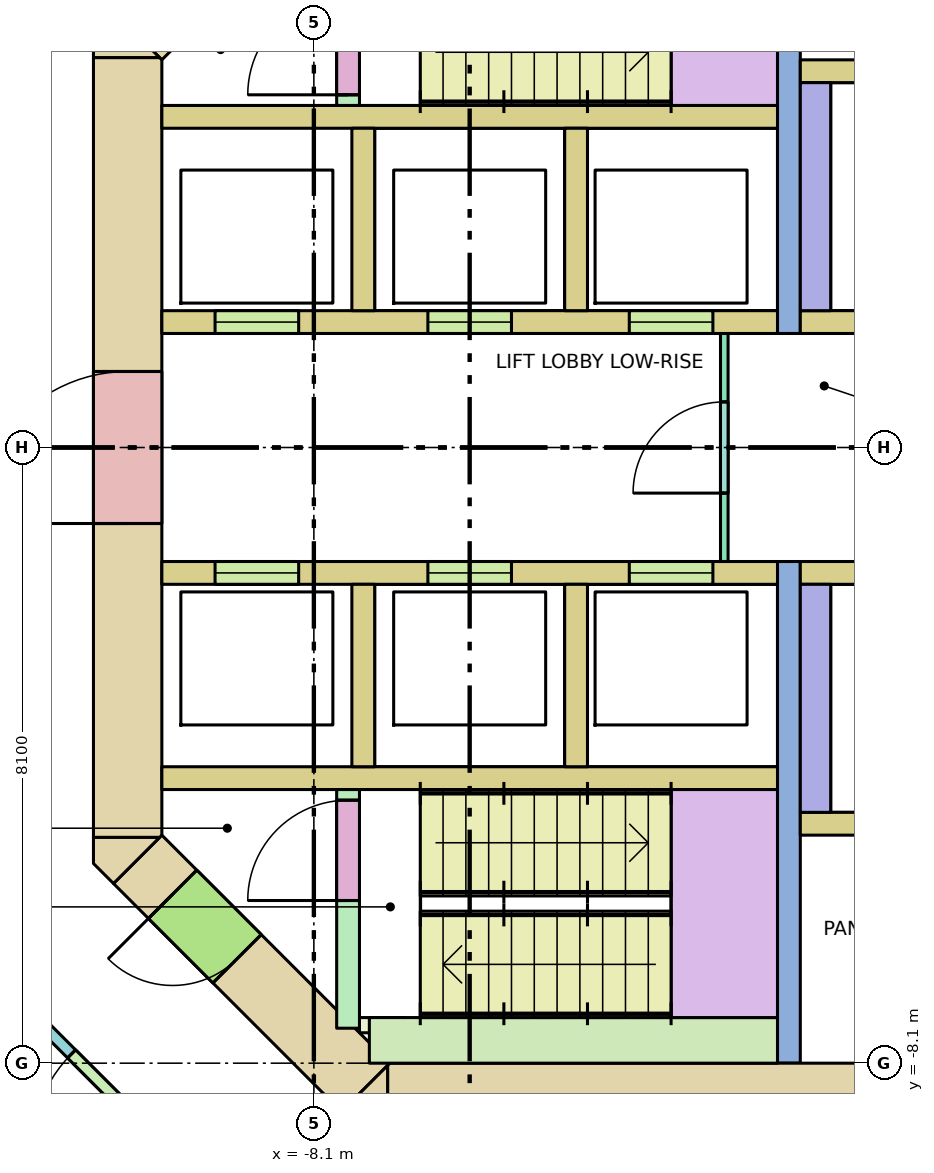
"""IFC4 building model, lengths in metres.
Left out: names, types, materials, properties, quantities, classifications, styles, units other than length and angle.
Written with IfcOpenShell. Run it as: python <this file> out.ifc"""

import sys

from ifc_helpers import new_model, si_unit, direction, frame, frame_2d, origin, place, context, subcontext, project, spatial, polyline, rectangle, outline, extrude, element, fill, save


model = new_model("IFC4")
c1 = context("Model", 3, precision=1e-05, world=origin(), true_north=direction((0.0, 1.0)))
c2 = subcontext(c1, "Body", "Model", "MODEL_VIEW")
j1 = project(units=[si_unit("LENGTHUNIT", "METRE"), si_unit("PLANEANGLEUNIT", "RADIAN")], contexts=[c1])
p1 = place(None, origin())
s1 = spatial("IfcSite", under=j1, at=p1, CompositionType="ELEMENT")
p2 = place(p1, origin())
s2 = spatial("IfcBuilding", under=s1, at=p2, CompositionType="ELEMENT")
p3 = place(p2, frame((0.0, 0.0, 27.0)))
s3 = spatial("IfcBuildingStorey", under=s2, at=p3, CompositionType="ELEMENT", Elevation=27.0)
p4 = place(p3, frame((-7.13, -8.55, -0.28), z_axis=(0.0, 0.0, 1.0), x_axis=(1.0, 0.0, 0.0)))
e1 = element("IfcWall", 1, at=p4, inside=s3, PredefinedType="SHEAR", context=c2, shape_type="SweptSolid", body=[
    extrude(rectangle(XDim=14.26, YDim=0.9, at=frame_2d((7.13, 0.0))), origin(), (0.0, 0.0, 1.0), 4.0),
])
p5 = place(p4, frame((8.08, 0.0, 0.28)))
e2 = element("IfcOpeningElement", 2, at=p5, cuts=e1, PredefinedType="OPENING", context=c2, shape_type="SweptSolid", body=[
    extrude(rectangle(XDim=0.7, YDim=2.1, at=frame_2d((0.35, 1.05))), frame((0.0, 0.46, 0.0), z_axis=(0.0, -1.0, 0.0), x_axis=(1.0, 0.0, 0.0)), (0.0, 0.0, 1.0), 0.92),
])
p6 = place(p4, frame((6.205, 0.0, 0.28)))
e3 = element("IfcOpeningElement", 3, at=p6, cuts=e1, PredefinedType="OPENING", context=c2, shape_type="SweptSolid", body=[
    extrude(rectangle(XDim=0.9, YDim=2.1, at=frame_2d((0.45, 1.05))), frame((0.0, 0.46, 0.0), z_axis=(0.0, -1.0, 0.0), x_axis=(1.0, 0.0, 0.0)), (0.0, 0.0, 1.0), 0.92),
])
p7 = place(p4, frame((10.667, 0.0, 0.28)))
e4 = element("IfcOpeningElement", 4, at=p7, cuts=e1, PredefinedType="OPENING", context=c2, shape_type="SweptSolid", body=[
    extrude(rectangle(XDim=0.9, YDim=2.1, at=frame_2d((0.45, 1.05))), frame((0.0, 0.46, 0.0), z_axis=(0.0, -1.0, 0.0), x_axis=(1.0, 0.0, 0.0)), (0.0, 0.0, 1.0), 0.92),
])
p8 = place(p3, frame((-10.55, -5.13, -0.28), z_axis=(0.0, 0.0, 1.0), x_axis=(0.0, 1.0, 0.0)))
e5 = element("IfcWall", 5, at=p8, inside=s3, PredefinedType="SHEAR", context=c2, shape_type="SweptSolid", body=[
    extrude(rectangle(XDim=10.26, YDim=0.9, at=frame_2d((5.13, 0.0))), origin(), (0.0, 0.0, 1.0), 4.0),
])
p9 = place(p8, frame((4.13, 0.0, 0.28)))
e6 = element("IfcOpeningElement", 6, at=p9, cuts=e5, PredefinedType="OPENING", context=c2, shape_type="SweptSolid", body=[
    extrude(rectangle(XDim=2.0, YDim=2.1, at=frame_2d((1.0, 1.05))), frame((0.0, 0.46, 0.0), z_axis=(0.0, -1.0, 0.0), x_axis=(1.0, 0.0, 0.0)), (0.0, 0.0, 1.0), 0.92),
])
p10 = place(p3, frame((-10.418, 5.418, -0.28), z_axis=(0.0, 0.0, 1.0), x_axis=(0.707106781187, 0.707106781187, 0.0)))
e7 = element("IfcWall", 7, at=p10, inside=s3, PredefinedType="SHEAR", context=c2, shape_type="SweptSolid", body=[
    extrude(rectangle(XDim=4.243, YDim=0.9, at=frame_2d((2.121, 0.0))), origin(), (0.0, 0.0, 1.0), 4.0),
])
p11 = place(p10, frame((0.65, 0.0, 0.28)))
e8 = element("IfcOpeningElement", 8, at=p11, cuts=e7, PredefinedType="OPENING", context=c2, shape_type="SweptSolid", body=[
    extrude(rectangle(XDim=1.2, YDim=2.1, at=frame_2d((0.6, 1.05))), frame((0.0, 0.46, 0.0), z_axis=(0.0, -1.0, 0.0), x_axis=(1.0, 0.0, 0.0)), (0.0, 0.0, 1.0), 0.92),
])
p12 = place(p3, frame((-7.418, -8.418, -0.28), z_axis=(0.0, 0.0, 1.0), x_axis=(-0.707106781187, 0.707106781187, 0.0)))
e9 = element("IfcWall", 9, at=p12, inside=s3, PredefinedType="SHEAR", context=c2, shape_type="SweptSolid", body=[
    extrude(rectangle(XDim=4.243, YDim=0.9, at=frame_2d((2.121, 0.0))), origin(), (0.0, 0.0, 1.0), 4.0),
])
p13 = place(p12, frame((2.393, 0.0, 0.28)))
e10 = element("IfcOpeningElement", 10, at=p13, cuts=e9, PredefinedType="OPENING", context=c2, shape_type="SweptSolid", body=[
    extrude(rectangle(XDim=1.2, YDim=2.1, at=frame_2d((0.6, 1.05))), frame((0.0, 0.46, 0.0), z_axis=(0.0, -1.0, 0.0), x_axis=(1.0, 0.0, 0.0)), (0.0, 0.0, 1.0), 0.92),
])
p14 = place(p3, frame((0.0, 0.0, -0.28)))
e11 = element("IfcWall", 11, at=p14, inside=s3, PredefinedType="SHEAR", context=c2, shape_type="SweptSolid", body=[
    extrude(outline(polyline([(-7.473, -9.0), (-7.736, -8.736), (-7.13, -8.13), (-7.13, -9.0), (-7.473, -9.0)])), origin(), (0.0, 0.0, 1.0), 4.0),
])
p15 = place(p3, frame((0.0, 0.0, -0.28)))
e12 = element("IfcWall", 12, at=p15, inside=s3, PredefinedType="SHEAR", context=c2, shape_type="SweptSolid", body=[
    extrude(outline(polyline([(-11.0, -5.473), (-11.0, -5.13), (-10.13, -5.13), (-10.736, -5.736), (-11.0, -5.473)])), origin(), (0.0, 0.0, 1.0), 4.0),
])
p16 = place(p3, frame((0.0, 0.0, -0.28)))
e13 = element("IfcWall", 13, at=p16, inside=s3, PredefinedType="SHEAR", context=c2, shape_type="SweptSolid", body=[
    extrude(outline(polyline([(-10.736, 5.736), (-10.13, 5.13), (-11.0, 5.13), (-11.0, 5.473), (-10.736, 5.736)])), origin(), (0.0, 0.0, 1.0), 4.0),
])
for number, where, z_axis, x_axis in (
    (14, (-10.1, 4.35, 0.0), (0.0, 0.0, 1.0), (1.0, 0.0, 0.0)),
    (15, (-10.1, -4.35, 0.0), (0.0, 0.0, 1.0), (1.0, 0.0, 0.0)),
):
    element("IfcWall", number, at=place(p3, frame(where, z_axis=z_axis, x_axis=x_axis)), inside=s3, PredefinedType="SOLIDWALL", context=c2, shape_type="SweptSolid", body=[
        extrude(rectangle(XDim=8.1, YDim=0.3, at=frame_2d((4.05, 0.0))), origin(), (0.0, 0.0, 1.0), 3.72),
    ])
p17 = place(p3, frame((-10.1, 1.65, 0.0), z_axis=(0.0, 0.0, 1.0), x_axis=(1.0, 0.0, 0.0)))
e16 = element("IfcWall", 16, at=p17, inside=s3, PredefinedType="SOLIDWALL", context=c2, shape_type="SweptSolid", body=[
    extrude(rectangle(XDim=8.1, YDim=0.3, at=frame_2d((4.05, 0.0))), origin(), (0.0, 0.0, 1.0), 3.72),
])
p18 = place(p17, frame((0.7, 0.0, 0.0)))
e17 = element("IfcOpeningElement", 17, at=p18, cuts=e16, PredefinedType="OPENING", context=c2, shape_type="SweptSolid", body=[
    extrude(rectangle(XDim=1.1, YDim=2.1, at=frame_2d((0.55, 1.05))), frame((0.0, 0.16, 0.0), z_axis=(0.0, -1.0, 0.0), x_axis=(1.0, 0.0, 0.0)), (0.0, 0.0, 1.0), 0.32),
])
p19 = place(p17, frame((3.5, 0.0, 0.0)))
e18 = element("IfcOpeningElement", 18, at=p19, cuts=e16, PredefinedType="OPENING", context=c2, shape_type="SweptSolid", body=[
    extrude(rectangle(XDim=1.1, YDim=2.1, at=frame_2d((0.55, 1.05))), frame((0.0, 0.16, 0.0), z_axis=(0.0, -1.0, 0.0), x_axis=(1.0, 0.0, 0.0)), (0.0, 0.0, 1.0), 0.32),
])
p20 = place(p17, frame((6.15, 0.0, 0.0)))
e19 = element("IfcOpeningElement", 19, at=p20, cuts=e16, PredefinedType="OPENING", context=c2, shape_type="SweptSolid", body=[
    extrude(rectangle(XDim=1.1, YDim=2.1, at=frame_2d((0.55, 1.05))), frame((0.0, 0.16, 0.0), z_axis=(0.0, -1.0, 0.0), x_axis=(1.0, 0.0, 0.0)), (0.0, 0.0, 1.0), 0.32),
])
p21 = place(p3, frame((-10.1, -1.65, 0.0), z_axis=(0.0, 0.0, 1.0), x_axis=(1.0, 0.0, 0.0)))
e20 = element("IfcWall", 20, at=p21, inside=s3, PredefinedType="SOLIDWALL", context=c2, shape_type="SweptSolid", body=[
    extrude(rectangle(XDim=8.1, YDim=0.3, at=frame_2d((4.05, 0.0))), origin(), (0.0, 0.0, 1.0), 3.72),
])
p22 = place(p21, frame((0.7, 0.0, 0.0)))
e21 = element("IfcOpeningElement", 21, at=p22, cuts=e20, PredefinedType="OPENING", context=c2, shape_type="SweptSolid", body=[
    extrude(rectangle(XDim=1.1, YDim=2.1, at=frame_2d((0.55, 1.05))), frame((0.0, 0.16, 0.0), z_axis=(0.0, -1.0, 0.0), x_axis=(1.0, 0.0, 0.0)), (0.0, 0.0, 1.0), 0.32),
])
p23 = place(p21, frame((3.5, 0.0, 0.0)))
e22 = element("IfcOpeningElement", 22, at=p23, cuts=e20, PredefinedType="OPENING", context=c2, shape_type="SweptSolid", body=[
    extrude(rectangle(XDim=1.1, YDim=2.1, at=frame_2d((0.55, 1.05))), frame((0.0, 0.16, 0.0), z_axis=(0.0, -1.0, 0.0), x_axis=(1.0, 0.0, 0.0)), (0.0, 0.0, 1.0), 0.32),
])
p24 = place(p21, frame((6.15, 0.0, 0.0)))
e23 = element("IfcOpeningElement", 23, at=p24, cuts=e20, PredefinedType="OPENING", context=c2, shape_type="SweptSolid", body=[
    extrude(rectangle(XDim=1.1, YDim=2.1, at=frame_2d((0.55, 1.05))), frame((0.0, 0.16, 0.0), z_axis=(0.0, -1.0, 0.0), x_axis=(1.0, 0.0, 0.0)), (0.0, 0.0, 1.0), 0.32),
])
for number, where, z_axis, x_axis in (
    (24, (-7.45, 1.8, 0.0), (0.0, 0.0, 1.0), (0.0, 1.0, 0.0)),
    (25, (-7.45, -4.2, 0.0), (0.0, 0.0, 1.0), (0.0, 1.0, 0.0)),
    (26, (-4.65, 1.8, 0.0), (0.0, 0.0, 1.0), (0.0, 1.0, 0.0)),
    (27, (-4.65, -4.2, 0.0), (0.0, 0.0, 1.0), (0.0, 1.0, 0.0)),
):
    element("IfcWall", number, at=place(p3, frame(where, z_axis=z_axis, x_axis=x_axis)), inside=s3, PredefinedType="SOLIDWALL", context=c2, shape_type="SweptSolid", body=[
        extrude(rectangle(XDim=2.4, YDim=0.3, at=frame_2d((1.2, 0.0))), origin(), (0.0, 0.0, 1.0), 3.72),
    ])
for number, where, z_axis, x_axis in (
    (28, (-1.85, 1.5, 0.0), (0.0, 0.0, 1.0), (0.0, 1.0, 0.0)),
    (29, (-1.85, -8.1, 0.0), (0.0, 0.0, 1.0), (0.0, 1.0, 0.0)),
):
    element("IfcWall", number, at=place(p3, frame(where, z_axis=z_axis, x_axis=x_axis)), inside=s3, PredefinedType="SHEAR", context=c2, shape_type="SweptSolid", body=[
        extrude(rectangle(XDim=6.6, YDim=0.3, at=frame_2d((3.3, 0.0))), origin(), (0.0, 0.0, 1.0), 3.72),
    ])
p25 = place(p3, frame((-1.7, 1.65, 0.0), z_axis=(0.0, 0.0, 1.0), x_axis=(1.0, 0.0, 0.0)))
e30 = element("IfcWall", 30, at=p25, inside=s3, PredefinedType="SOLIDWALL", context=c2, shape_type="SweptSolid", body=[
    extrude(rectangle(XDim=3.4, YDim=0.3, at=frame_2d((1.7, 0.0))), origin(), (0.0, 0.0, 1.0), 3.72),
])
p26 = place(p25, frame((1.15, 0.0, 0.0)))
e31 = element("IfcOpeningElement", 31, at=p26, cuts=e30, PredefinedType="OPENING", context=c2, shape_type="SweptSolid", body=[
    extrude(rectangle(XDim=1.1, YDim=2.1, at=frame_2d((0.55, 1.05))), frame((0.0, 0.16, 0.0), z_axis=(0.0, -1.0, 0.0), x_axis=(1.0, 0.0, 0.0)), (0.0, 0.0, 1.0), 0.32),
])
p27 = place(p3, frame((-1.7, -1.65, 0.0), z_axis=(0.0, 0.0, 1.0), x_axis=(1.0, 0.0, 0.0)))
e32 = element("IfcWall", 32, at=p27, inside=s3, PredefinedType="SOLIDWALL", context=c2, shape_type="SweptSolid", body=[
    extrude(rectangle(XDim=3.4, YDim=0.3, at=frame_2d((1.7, 0.0))), origin(), (0.0, 0.0, 1.0), 3.72),
])
p28 = place(p27, frame((1.15, 0.0, 0.0)))
e33 = element("IfcOpeningElement", 33, at=p28, cuts=e32, PredefinedType="OPENING", context=c2, shape_type="SweptSolid", body=[
    extrude(rectangle(XDim=1.1, YDim=2.1, at=frame_2d((0.55, 1.05))), frame((0.0, 0.16, 0.0), z_axis=(0.0, -1.0, 0.0), x_axis=(1.0, 0.0, 0.0)), (0.0, 0.0, 1.0), 0.32),
])
for number, where, z_axis, x_axis in (
    (34, (-1.5, 1.8, 0.0), (0.0, 0.0, 1.0), (0.0, 1.0, 0.0)),
    (35, (-1.5, -4.8, 0.0), (0.0, 0.0, 1.0), (0.0, 1.0, 0.0)),
):
    element("IfcWall", number, at=place(p3, frame(where, z_axis=z_axis, x_axis=x_axis)), inside=s3, PredefinedType="SOLIDWALL", context=c2, shape_type="SweptSolid", body=[
        extrude(rectangle(XDim=3.0, YDim=0.4, at=frame_2d((1.5, 0.0))), origin(), (0.0, 0.0, 1.0), 3.72),
    ])
for number, where, z_axis, x_axis in (
    (36, (-1.7, 4.95, 0.0), (0.0, 0.0, 1.0), (1.0, 0.0, 0.0)),
    (37, (-1.7, -4.95, 0.0), (0.0, 0.0, 1.0), (1.0, 0.0, 0.0)),
):
    element("IfcWall", number, at=place(p3, frame(where, z_axis=z_axis, x_axis=x_axis)), inside=s3, PredefinedType="SOLIDWALL", context=c2, shape_type="SweptSolid", body=[
        extrude(rectangle(XDim=3.4, YDim=0.3, at=frame_2d((1.7, 0.0))), origin(), (0.0, 0.0, 1.0), 3.72),
    ])
p29 = place(p3, frame((-7.65, 4.5, 0.0), z_axis=(0.0, 0.0, 1.0), x_axis=(0.0, 1.0, 0.0)))
e38 = element("IfcWall", 38, at=p29, inside=s3, PredefinedType="SHEAR", context=c2, shape_type="SweptSolid", body=[
    extrude(rectangle(XDim=3.14, YDim=0.3, at=frame_2d((1.57, 0.0))), origin(), (0.0, 0.0, 1.0), 3.72),
])
p30 = place(p29, frame((0.14, 0.0, 0.0)))
e39 = element("IfcOpeningElement", 39, at=p30, cuts=e38, PredefinedType="OPENING", context=c2, shape_type="SweptSolid", body=[
    extrude(rectangle(XDim=1.32, YDim=2.1, at=frame_2d((0.66, 1.05))), frame((0.0, 0.16, 0.0), z_axis=(0.0, -1.0, 0.0), x_axis=(1.0, 0.0, 0.0)), (0.0, 0.0, 1.0), 0.32),
])
p31 = place(p3, frame((-7.65, -7.64, 0.0), z_axis=(0.0, 0.0, 1.0), x_axis=(0.0, 1.0, 0.0)))
e40 = element("IfcWall", 40, at=p31, inside=s3, PredefinedType="SHEAR", context=c2, shape_type="SweptSolid", body=[
    extrude(rectangle(XDim=3.14, YDim=0.3, at=frame_2d((1.57, 0.0))), origin(), (0.0, 0.0, 1.0), 3.72),
])
p32 = place(p31, frame((1.68, 0.0, 0.0)))
e41 = element("IfcOpeningElement", 41, at=p32, cuts=e40, PredefinedType="OPENING", context=c2, shape_type="SweptSolid", body=[
    extrude(rectangle(XDim=1.32, YDim=2.1, at=frame_2d((0.66, 1.05))), frame((0.0, 0.16, 0.0), z_axis=(0.0, -1.0, 0.0), x_axis=(1.0, 0.0, 0.0)), (0.0, 0.0, 1.0), 0.32),
])
p33 = place(p3, frame((-7.5, -7.6, 0.0), z_axis=(0.0, 0.0, 1.0), x_axis=(1.0, 0.0, 0.0)))
e42 = element("IfcWall", 42, at=p33, inside=s3, PredefinedType="SHEAR", context=c2, shape_type="SweptSolid", body=[
    extrude(rectangle(XDim=0.6, YDim=0.2, at=frame_2d((0.3, 0.0))), origin(), (0.0, 0.0, 1.0), 3.72),
])
p34 = place(p3, frame((-7.37, -7.8, 0.0), z_axis=(0.0, 0.0, 1.0), x_axis=(1.0, 0.0, 0.0)))
e43 = element("IfcWall", 43, at=p34, inside=s3, PredefinedType="SHEAR", context=c2, shape_type="SweptSolid", body=[
    extrude(rectangle(XDim=5.37, YDim=0.6, at=frame_2d((2.685, 0.0))), origin(), (0.0, 0.0, 1.0), 3.72),
])
p35 = place(p3, frame((-2.7, -1.5, 0.0), z_axis=(0.0, 0.0, 1.0), x_axis=(0.0, 1.0, 0.0)))
e44 = element("IfcWall", 44, at=p35, inside=s3, PredefinedType="PARTITIONING", context=c2, shape_type="SweptSolid", body=[
    extrude(rectangle(XDim=3.0, YDim=0.1, at=frame_2d((1.5, 0.0))), origin(), (0.0, 0.0, 1.0), 3.72),
])
p36 = place(p35, frame((0.9, 0.0, 0.0)))
e45 = element("IfcOpeningElement", 45, at=p36, cuts=e44, PredefinedType="OPENING", context=c2, shape_type="SweptSolid", body=[
    extrude(rectangle(XDim=1.2, YDim=2.1, at=frame_2d((0.6, 1.05))), frame((0.0, 0.06, 0.0), z_axis=(0.0, -1.0, 0.0), x_axis=(1.0, 0.0, 0.0)), (0.0, 0.0, 1.0), 0.12),
])
p37 = place(p3, frame((-8.328, -10.938, 0.0), z_axis=(0.0, 0.0, 1.0), x_axis=(-0.707125355289, 0.707088206597, 0.0)))
e46 = element("IfcWall", 46, at=p37, inside=s3, PredefinedType="PARTITIONING", context=c2, shape_type="SweptSolid", body=[
    extrude(rectangle(XDim=6.572, YDim=0.15, at=frame_2d((3.286, 0.0))), origin(), (0.0, 0.0, 1.0), 2.82),
])
p38 = place(p37, frame((2.386, 0.0, 0.0)))
e47 = element("IfcOpeningElement", 47, at=p38, cuts=e46, PredefinedType="OPENING", context=c2, shape_type="SweptSolid", body=[
    extrude(rectangle(XDim=1.8, YDim=2.1, at=frame_2d((0.9, 1.05))), frame((0.0, 0.085, 0.0), z_axis=(0.0, -1.0, 0.0), x_axis=(1.0, 0.0, 0.0)), (0.0, 0.0, 1.0), 0.17),
])
p39 = place(p18, origin())
e48 = element("IfcDoor", 48, at=p39, inside=s3, OperationType="DOUBLE_DOOR_SLIDING", PredefinedType="DOOR", context=c2, shape_type="SweptSolid", body=[
    extrude(rectangle(XDim=1.1, YDim=2.1, at=frame_2d((0.55, 1.05))), frame((0.0, 0.025, 0.0), z_axis=(0.0, -1.0, 0.0), x_axis=(1.0, 0.0, 0.0)), (0.0, 0.0, 1.0), 0.05),
])
fill(e17, e48)
p40 = place(p19, origin())
e49 = element("IfcDoor", 49, at=p40, inside=s3, OperationType="DOUBLE_DOOR_SLIDING", PredefinedType="DOOR", context=c2, shape_type="SweptSolid", body=[
    extrude(rectangle(XDim=1.1, YDim=2.1, at=frame_2d((0.55, 1.05))), frame((0.0, 0.025, 0.0), z_axis=(0.0, -1.0, 0.0), x_axis=(1.0, 0.0, 0.0)), (0.0, 0.0, 1.0), 0.05),
])
fill(e18, e49)
p41 = place(p20, origin())
e50 = element("IfcDoor", 50, at=p41, inside=s3, OperationType="DOUBLE_DOOR_SLIDING", PredefinedType="DOOR", context=c2, shape_type="SweptSolid", body=[
    extrude(rectangle(XDim=1.1, YDim=2.1, at=frame_2d((0.55, 1.05))), frame((0.0, 0.025, 0.0), z_axis=(0.0, -1.0, 0.0), x_axis=(1.0, 0.0, 0.0)), (0.0, 0.0, 1.0), 0.05),
])
fill(e19, e50)
p42 = place(p22, origin())
e51 = element("IfcDoor", 51, at=p42, inside=s3, OperationType="DOUBLE_DOOR_SLIDING", PredefinedType="DOOR", context=c2, shape_type="SweptSolid", body=[
    extrude(rectangle(XDim=1.1, YDim=2.1, at=frame_2d((0.55, 1.05))), frame((0.0, 0.025, 0.0), z_axis=(0.0, -1.0, 0.0), x_axis=(1.0, 0.0, 0.0)), (0.0, 0.0, 1.0), 0.05),
])
fill(e21, e51)
p43 = place(p23, origin())
e52 = element("IfcDoor", 52, at=p43, inside=s3, OperationType="DOUBLE_DOOR_SLIDING", PredefinedType="DOOR", context=c2, shape_type="SweptSolid", body=[
    extrude(rectangle(XDim=1.1, YDim=2.1, at=frame_2d((0.55, 1.05))), frame((0.0, 0.025, 0.0), z_axis=(0.0, -1.0, 0.0), x_axis=(1.0, 0.0, 0.0)), (0.0, 0.0, 1.0), 0.05),
])
fill(e22, e52)
p44 = place(p24, origin())
e53 = element("IfcDoor", 53, at=p44, inside=s3, OperationType="DOUBLE_DOOR_SLIDING", PredefinedType="DOOR", context=c2, shape_type="SweptSolid", body=[
    extrude(rectangle(XDim=1.1, YDim=2.1, at=frame_2d((0.55, 1.05))), frame((0.0, 0.025, 0.0), z_axis=(0.0, -1.0, 0.0), x_axis=(1.0, 0.0, 0.0)), (0.0, 0.0, 1.0), 0.05),
])
fill(e23, e53)
p45 = place(p30, origin())
e54 = element("IfcDoor", 54, at=p45, inside=s3, OperationType="DOUBLE_DOOR_SINGLE_SWING", PredefinedType="DOOR", context=c2, shape_type="SweptSolid", body=[
    extrude(rectangle(XDim=1.32, YDim=2.1, at=frame_2d((0.66, 1.05))), frame((0.0, 0.025, 0.0), z_axis=(0.0, -1.0, 0.0), x_axis=(1.0, 0.0, 0.0)), (0.0, 0.0, 1.0), 0.05),
])
fill(e39, e54)
p46 = place(p32, origin())
e55 = element("IfcDoor", 55, at=p46, inside=s3, OperationType="DOUBLE_DOOR_SINGLE_SWING", PredefinedType="DOOR", context=c2, shape_type="SweptSolid", body=[
    extrude(rectangle(XDim=1.32, YDim=2.1, at=frame_2d((0.66, 1.05))), frame((0.0, 0.025, 0.0), z_axis=(0.0, -1.0, 0.0), x_axis=(1.0, 0.0, 0.0)), (0.0, 0.0, 1.0), 0.05),
])
fill(e41, e55)
p47 = place(p13, origin())
e56 = element("IfcDoor", 56, at=p47, inside=s3, OperationType="SINGLE_SWING_RIGHT", PredefinedType="DOOR", context=c2, shape_type="SweptSolid", body=[
    extrude(rectangle(XDim=1.2, YDim=2.1, at=frame_2d((0.6, 1.05))), frame((0.0, 0.025, 0.0), z_axis=(0.0, -1.0, 0.0), x_axis=(1.0, 0.0, 0.0)), (0.0, 0.0, 1.0), 0.05),
])
fill(e10, e56)
p48 = place(p9, origin())
e57 = element("IfcDoor", 57, at=p48, inside=s3, OperationType="DOUBLE_DOOR_SINGLE_SWING", PredefinedType="DOOR", context=c2, shape_type="SweptSolid", body=[
    extrude(rectangle(XDim=2.0, YDim=2.1, at=frame_2d((1.0, 1.05))), frame((0.0, 0.025, 0.0), z_axis=(0.0, -1.0, 0.0), x_axis=(1.0, 0.0, 0.0)), (0.0, 0.0, 1.0), 0.05),
])
fill(e6, e57)
p49 = place(p36, origin())
e58 = element("IfcDoor", 58, at=p49, inside=s3, OperationType="SINGLE_SWING_LEFT", PredefinedType="DOOR", context=c2, shape_type="SweptSolid", body=[
    extrude(rectangle(XDim=1.2, YDim=2.1, at=frame_2d((0.6, 1.05))), frame((0.0, 0.025, 0.0), z_axis=(0.0, -1.0, 0.0), x_axis=(1.0, 0.0, 0.0)), (0.0, 0.0, 1.0), 0.05),
])
fill(e45, e58)
p50 = place(p38, origin())
e59 = element("IfcDoor", 59, at=p50, inside=s3, OperationType="DOUBLE_DOOR_SINGLE_SWING", PredefinedType="DOOR", context=c2, shape_type="SweptSolid", body=[
    extrude(rectangle(XDim=1.8, YDim=2.1, at=frame_2d((0.9, 1.05))), frame((0.0, 0.025, 0.0), z_axis=(0.0, -1.0, 0.0), x_axis=(1.0, 0.0, 0.0)), (0.0, 0.0, 1.0), 0.05),
])
fill(e47, e59)
save(model, sys.argv[1])
